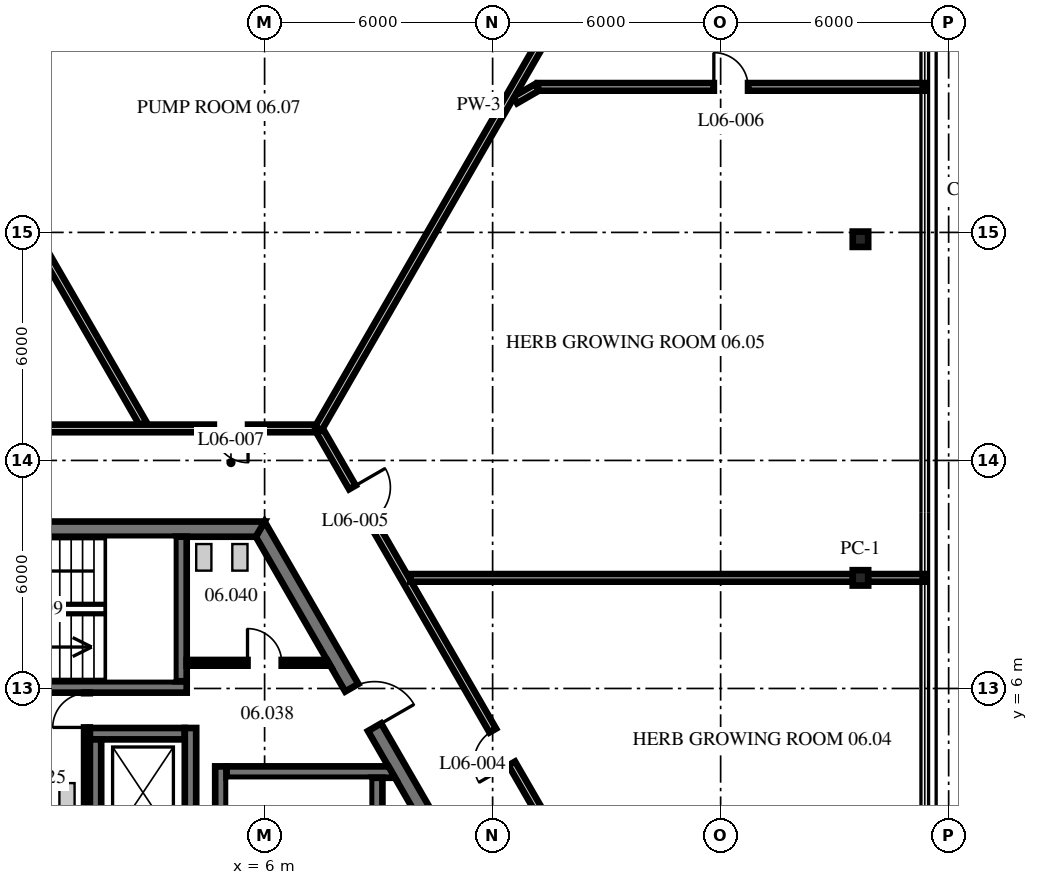
"""IFC4 building model, lengths in metres.
Left out: names, types, materials, properties, quantities, classifications, styles, units other than length and angle.
Written with IfcOpenShell. Run it as: python <this file> out.ifc"""

import sys

from ifc_helpers import new_model, si_unit, direction, frame, frame_2d, origin, origin_2d, place, context, subcontext, project, spatial, polyline, rectangle, i_section, outline, extrude, source, transform, mapped, element, fill, save


model = new_model("IFC4")
c1 = context("Model", 3, precision=1e-05, world=origin(), true_north=direction((0.0, 1.0)))
c2 = subcontext(c1, "Body", "Model", "MODEL_VIEW")
j1 = project(units=[si_unit("LENGTHUNIT", "METRE"), si_unit("PLANEANGLEUNIT", "RADIAN")], contexts=[c1])
p1 = place(None, origin())
s1 = spatial("IfcSite", under=j1, at=p1, CompositionType="ELEMENT")
p2 = place(p1, origin())
s2 = spatial("IfcBuilding", under=s1, at=p2, CompositionType="ELEMENT")
p3 = place(p2, frame((0.0, 0.0, 28.9)))
s3 = spatial("IfcBuildingStorey", under=s2, at=p3, CompositionType="ELEMENT", Elevation=28.9)
m1 = source(origin(), c2, "Body", "SweptSolid", [
    extrude(i_section(OverallWidth=0.404, OverallDepth=0.406, WebThickness=0.027, FlangeThickness=0.044, at=origin_2d()), origin(), (0.0, 0.0, 1.0), 4.3),
])
for number, where, z_axis, x_axis in (
    (1, (21.679, 8.91, 0.0), (0.0, 0.0, 1.0), (0.0, 1.0, 0.0)),
    (2, (21.679, 17.82, 0.0), (0.0, 0.0, 1.0), (0.0, 1.0, 0.0)),
):
    element("IfcColumn", number, at=place(p3, frame(where, z_axis=z_axis, x_axis=x_axis)), inside=s3, PredefinedType="COLUMN", context=c2, shape_type="MappedRepresentation", body=[
        mapped(m1, transform((0.0, 0.0, 0.0), scale=1.0)),
    ])
m2 = source(origin(), c2, "Body", "SweptSolid", [
    extrude(outline(polyline([(-0.115, -0.2), (11.885, -0.2), (11.654, 0.2), (0.115, 0.2), (-0.115, -0.2)])), origin(), (0.0, 0.0, 1.0), 4.1),
])
p4 = place(p3, frame((11.769, 0.0, 0.0), z_axis=(0.0, 0.0, 1.0), x_axis=(-0.499996592174, 0.866027371285, 0.0)))
e3 = element("IfcWall", 3, at=p4, inside=s3, PredefinedType="SHEAR", context=c2, shape_type="MappedRepresentation", body=[
    mapped(m2, transform((0.0, 0.0, 0.0), scale=1.0)),
])
p5 = place(p4, frame((5.75, 0.0, 0.0)))
e4 = element("IfcOpeningElement", 4, at=p5, cuts=e3, PredefinedType="OPENING", context=c2, shape_type="SweptSolid", body=[
    extrude(rectangle(XDim=1.2, YDim=2.1, at=frame_2d((0.6, 1.05))), frame((0.0, 0.21, 0.0), z_axis=(0.0, -1.0, 0.0), x_axis=(1.0, 0.0, 0.0)), (0.0, 0.0, 1.0), 0.42),
])
p6 = place(p3, frame((5.885, 10.192, 0.0), z_axis=(0.0, 0.0, 1.0), x_axis=(-1.0, 0.0, 0.0)))
e5 = element("IfcWall", 5, at=p6, inside=s3, PredefinedType="SHEAR", context=c2, shape_type="MappedRepresentation", body=[
    mapped(m2, transform((0.0, 0.0, 0.0), scale=1.0)),
])
p7 = place(p6, frame((7.985, 0.0, 0.0)))
e6 = element("IfcOpeningElement", 6, at=p7, cuts=e5, PredefinedType="OPENING", context=c2, shape_type="SweptSolid", body=[
    extrude(rectangle(XDim=1.2, YDim=2.1, at=frame_2d((0.6, 1.05))), frame((0.0, 0.21, 0.0), z_axis=(0.0, -1.0, 0.0), x_axis=(1.0, 0.0, 0.0)), (0.0, 0.0, 1.0), 0.42),
])
m3 = source(origin(), c2, "Body", "SweptSolid", [
    extrude(rectangle(XDim=2.5, YDim=0.3, at=frame_2d((1.25, 0.0))), origin(), (0.0, 0.0, 1.0), 4.1),
])
p8 = place(p3, frame((1.4, 4.81, 0.0), z_axis=(0.0, 0.0, 1.0), x_axis=(1.0, 0.0, 0.0)))
e7 = element("IfcWall", 7, at=p8, inside=s3, PredefinedType="SHEAR", context=c2, shape_type="MappedRepresentation", body=[
    mapped(m3, transform((0.0, 0.0, 0.0), scale=1.0)),
])
m4 = source(origin(), c2, "Body", "SweptSolid", [
    extrude(rectangle(XDim=4.45, YDim=0.3, at=frame_2d((2.225, 0.0))), origin(), (0.0, 0.0, 1.0), 4.1),
])
p9 = place(p3, frame((1.55, 0.21, 0.0), z_axis=(0.0, 0.0, 1.0), x_axis=(0.0, 1.0, 0.0)))
e8 = element("IfcWall", 8, at=p9, inside=s3, PredefinedType="SHEAR", context=c2, shape_type="MappedRepresentation", body=[
    mapped(m4, transform((0.0, 0.0, 0.0), scale=1.0)),
])
m5 = source(origin(), c2, "Body", "SweptSolid", [
    extrude(rectangle(XDim=2.9, YDim=0.3, at=frame_2d((1.45, 0.0))), origin(), (0.0, 0.0, 1.0), 4.1),
])
p10 = place(p3, frame((4.05, 2.06, 0.0), z_axis=(0.0, 0.0, 1.0), x_axis=(0.0, 1.0, 0.0)))
e9 = element("IfcWall", 9, at=p10, inside=s3, PredefinedType="SHEAR", context=c2, shape_type="MappedRepresentation", body=[
    mapped(m5, transform((0.0, 0.0, 0.0), scale=1.0)),
])
m6 = source(origin(), c2, "Body", "SweptSolid", [
    extrude(outline(polyline([(-0.15, -0.15), (9.99, -0.15), (9.99, 0.15), (0.15, 0.15), (-0.15, -0.15)])), origin(), (0.0, 0.0, 1.0), 4.1),
])
p11 = place(p3, frame((4.85, -6.04, 0.0), z_axis=(0.0, 0.0, 1.0), x_axis=(0.0, 1.0, 0.0)))
e10 = element("IfcWall", 10, at=p11, inside=s3, PredefinedType="SHEAR", context=c2, shape_type="MappedRepresentation", body=[
    mapped(m6, transform((0.0, 0.0, 0.0), scale=1.0)),
])
p12 = place(p11, frame((3.19, 0.0, 0.0)))
e11 = element("IfcOpeningElement", 11, at=p12, cuts=e10, PredefinedType="OPENING", context=c2, shape_type="SweptSolid", body=[
    extrude(rectangle(XDim=1.1, YDim=2.1, at=frame_2d((0.55, 1.05))), frame((0.0, 0.16, 0.0), z_axis=(0.0, -1.0, 0.0), x_axis=(1.0, 0.0, 0.0)), (0.0, 0.0, 1.0), 0.32),
])
m7 = source(origin(), c2, "Body", "SweptSolid", [
    extrude(outline(polyline([(0.0, -0.15), (0.0, 0.15), (4.26, 0.15), (4.433, -0.15), (0.0, -0.15)])), origin(), (0.0, 0.0, 1.0), 4.1),
])
p13 = place(p3, frame((5.0, 3.8, 0.0), z_axis=(0.0, 0.0, 1.0), x_axis=(1.0, 0.0, 0.0)))
e12 = element("IfcWall", 12, at=p13, inside=s3, PredefinedType="SHEAR", context=c2, shape_type="MappedRepresentation", body=[
    mapped(m7, transform((0.0, 0.0, 0.0), scale=1.0)),
])
m8 = source(origin(), c2, "Body", "SweptSolid", [
    extrude(rectangle(XDim=7.3, YDim=0.3, at=frame_2d((3.65, 0.0))), origin(), (0.0, 0.0, 1.0), 4.1),
])
p14 = place(p3, frame((8.95, -3.65, 0.0), z_axis=(0.0, 0.0, 1.0), x_axis=(0.0, 1.0, 0.0)))
e13 = element("IfcWall", 13, at=p14, inside=s3, PredefinedType="SHEAR", context=c2, shape_type="MappedRepresentation", body=[
    mapped(m8, transform((0.0, 0.0, 0.0), scale=1.0)),
])
m9 = source(origin(), c2, "Body", "SweptSolid", [
    extrude(rectangle(XDim=7.9, YDim=0.3, at=frame_2d((3.95, 0.0))), origin(), (0.0, 0.0, 1.0), 4.1),
])
p15 = place(p3, frame((-3.95, 6.04, 0.0), z_axis=(0.0, 0.0, 1.0), x_axis=(1.0, 0.0, 0.0)))
e14 = element("IfcWall", 14, at=p15, inside=s3, PredefinedType="SHEAR", context=c2, shape_type="MappedRepresentation", body=[
    mapped(m9, transform((0.0, 0.0, 0.0), scale=1.0)),
])
m10 = source(origin(), c2, "Body", "SweptSolid", [
    extrude(outline(polyline([(0.0, -0.15), (0.0, 0.15), (3.804, 0.15), (3.804, -0.15), (0.0, -0.15)])), origin(), (0.0, 0.0, 1.0), 4.1),
])
p16 = place(p3, frame((3.8, 6.19, 0.0), z_axis=(0.0, 0.0, 1.0), x_axis=(0.0, 1.0, 0.0)))
e15 = element("IfcWall", 15, at=p16, inside=s3, PredefinedType="SHEAR", context=c2, shape_type="MappedRepresentation", body=[
    mapped(m10, transform((0.0, 0.0, 0.0), scale=1.0)),
])
m11 = source(origin(), c2, "Body", "SweptSolid", [
    extrude(rectangle(XDim=3.18, YDim=0.15, at=frame_2d((1.59, 0.0))), origin(), (0.0, 0.0, 1.0), 4.1),
])
p17 = place(p3, frame((1.325, 2.71, 0.0), z_axis=(0.0, 0.0, 1.0), x_axis=(0.0, 1.0, 0.0)))
e16 = element("IfcWall", 16, at=p17, inside=s3, PredefinedType="PARTITIONING", context=c2, shape_type="MappedRepresentation", body=[
    mapped(m11, transform((0.0, 0.0, 0.0), scale=1.0)),
])
p18 = place(p17, frame((2.265, 0.0, 0.0)))
e17 = element("IfcOpeningElement", 17, at=p18, cuts=e16, PredefinedType="OPENING", context=c2, shape_type="SweptSolid", body=[
    extrude(rectangle(XDim=0.9, YDim=2.1, at=frame_2d((0.45, 1.05))), frame((0.0, 0.085, 0.0), z_axis=(0.0, -1.0, 0.0), x_axis=(1.0, 0.0, 0.0)), (0.0, 0.0, 1.0), 0.17),
])
m12 = source(origin(), c2, "Body", "SweptSolid", [
    extrude(outline(polyline([(0.0, -0.075), (0.0, 0.075), (3.693, 0.075), (3.78, -0.075), (0.0, -0.075)])), origin(), (0.0, 0.0, 1.0), 4.1),
])
p19 = place(p3, frame((3.95, 6.675, 0.0), z_axis=(0.0, 0.0, 1.0), x_axis=(1.0, 0.0, 0.0)))
e18 = element("IfcWall", 18, at=p19, inside=s3, PredefinedType="PARTITIONING", context=c2, shape_type="MappedRepresentation", body=[
    mapped(m12, transform((0.0, 0.0, 0.0), scale=1.0)),
])
p20 = place(p19, frame((1.6, 0.0, 0.0)))
e19 = element("IfcOpeningElement", 19, at=p20, cuts=e18, PredefinedType="OPENING", context=c2, shape_type="SweptSolid", body=[
    extrude(rectangle(XDim=0.9, YDim=2.1, at=frame_2d((0.45, 1.05))), frame((0.0, 0.085, 0.0), z_axis=(0.0, -1.0, 0.0), x_axis=(1.0, 0.0, 0.0)), (0.0, 0.0, 1.0), 0.17),
])
m13 = source(origin(), c2, "Body", "SweptSolid", [
    extrude(rectangle(XDim=11.652, YDim=0.2, at=frame_2d((5.826, 0.0))), origin(), (0.0, 0.0, 1.0), 3.343),
])
p21 = place(p3, frame((-3.027, 23.063, 0.0), z_axis=(0.0, 0.0, 1.0), x_axis=(0.499992708539, -0.86602961347, 0.0)))
e20 = element("IfcWall", 20, at=p21, inside=s3, PredefinedType="PARTITIONING", context=c2, shape_type="MappedRepresentation", body=[
    mapped(m13, transform((0.0, 0.0, 0.0), scale=1.0)),
])
m14 = source(origin(), c2, "Body", "SweptSolid", [
    extrude(rectangle(XDim=14.759, YDim=0.2, at=frame_2d((7.379, 0.0))), origin(), (0.0, 0.0, 1.0), 4.1),
])
p22 = place(p3, frame((7.449, 12.782, 0.0), z_axis=(0.0, 0.0, 1.0), x_axis=(0.500005012202, -0.866022509969, 0.0)))
e21 = element("IfcWall", 21, at=p22, inside=s3, PredefinedType="PARTITIONING", context=c2, shape_type="MappedRepresentation", body=[
    mapped(m14, transform((0.0, 0.0, 0.0), scale=1.0)),
])
p23 = place(p22, frame((9.109, 0.0, 0.0)))
e22 = element("IfcOpeningElement", 22, at=p23, cuts=e21, PredefinedType="OPENING", context=c2, shape_type="SweptSolid", body=[
    extrude(rectangle(XDim=1.0, YDim=2.1, at=frame_2d((0.5, 1.05))), frame((0.0, 0.11, 0.0), z_axis=(0.0, -1.0, 0.0), x_axis=(1.0, 0.0, 0.0)), (0.0, 0.0, 1.0), 0.22),
])
p24 = place(p22, frame((1.721, 0.0, 0.0)))
e23 = element("IfcOpeningElement", 23, at=p24, cuts=e21, PredefinedType="OPENING", context=c2, shape_type="SweptSolid", body=[
    extrude(rectangle(XDim=1.0, YDim=2.1, at=frame_2d((0.5, 1.05))), frame((0.0, 0.11, 0.0), z_axis=(0.0, -1.0, 0.0), x_axis=(1.0, 0.0, 0.0)), (0.0, 0.0, 1.0), 0.22),
])
p25 = place(p3, frame((9.835, 8.91, 0.0), z_axis=(0.0, 0.0, 1.0), x_axis=(1.0, 0.0, 0.0)))
e24 = element("IfcWall", 24, at=p25, inside=s3, PredefinedType="PARTITIONING", context=c2, shape_type="MappedRepresentation", body=[
    mapped(m13, transform((0.0, 0.0, 0.0), scale=1.0)),
])
m15 = source(origin(), c2, "Body", "SweptSolid", [
    extrude(rectangle(XDim=1.499, YDim=0.2, at=frame_2d((0.749, 0.0))), origin(), (0.0, 0.0, 1.0), 4.1),
])
p26 = place(p3, frame((21.873, 8.91, 0.0), z_axis=(0.0, 0.0, 1.0), x_axis=(1.0, 0.0, 0.0)))
e25 = element("IfcWall", 25, at=p26, inside=s3, PredefinedType="PARTITIONING", context=c2, shape_type="MappedRepresentation", body=[
    mapped(m15, transform((0.0, 0.0, 0.0), scale=1.0)),
])
m16 = source(origin(), c2, "Body", "SweptSolid", [
    extrude(rectangle(XDim=14.689, YDim=0.2, at=frame_2d((7.344, 0.0))), origin(), (0.0, 0.0, 1.0), 4.1),
])
p27 = place(p3, frame((-7.344, 12.842, 0.0), z_axis=(0.0, 0.0, 1.0), x_axis=(1.0, 0.0, 0.0)))
e26 = element("IfcWall", 26, at=p27, inside=s3, PredefinedType="PARTITIONING", context=c2, shape_type="MappedRepresentation", body=[
    mapped(m16, transform((0.0, 0.0, 0.0), scale=1.0)),
])
p28 = place(p27, frame((12.009, 0.0, 0.0)))
e27 = element("IfcOpeningElement", 27, at=p28, cuts=e26, PredefinedType="OPENING", context=c2, shape_type="SweptSolid", body=[
    extrude(rectangle(XDim=0.9, YDim=2.1, at=frame_2d((0.45, 1.05))), frame((0.0, 0.11, 0.0), z_axis=(0.0, -1.0, 0.0), x_axis=(1.0, 0.0, 0.0)), (0.0, 0.0, 1.0), 0.22),
])
p29 = place(p3, frame((13.192, 21.83, 0.0), z_axis=(0.0, 0.0, 1.0), x_axis=(1.0, 0.0, 0.0)))
e28 = element("IfcWall", 28, at=p29, inside=s3, PredefinedType="PARTITIONING", context=c2, shape_type="SweptSolid", body=[
    extrude(rectangle(XDim=10.18, YDim=0.2, at=frame_2d((5.09, 0.0))), origin(), (0.0, 0.0, 1.0), 4.1),
])
p30 = place(p29, frame((4.63, 0.0, 0.0)))
e29 = element("IfcOpeningElement", 29, at=p30, cuts=e28, PredefinedType="OPENING", context=c2, shape_type="SweptSolid", body=[
    extrude(rectangle(XDim=0.9, YDim=2.1, at=frame_2d((0.45, 1.05))), frame((0.0, 0.11, 0.0), z_axis=(0.0, -1.0, 0.0), x_axis=(1.0, 0.0, 0.0)), (0.0, 0.0, 1.0), 0.22),
])
p31 = place(p3, frame((12.594, 21.485, 0.0), z_axis=(0.0, 0.0, 1.0), x_axis=(0.865932775861, 0.500160401961, 0.0)))
e30 = element("IfcWall", 30, at=p31, inside=s3, PredefinedType="PARTITIONING", context=c2, shape_type="SweptSolid", body=[
    extrude(rectangle(XDim=0.659, YDim=0.2, at=frame_2d((0.33, 0.0))), origin(), (0.0, 0.0, 1.0), 4.1),
])
m17 = source(origin(), c2, "Body", "SweptSolid", [
    extrude(rectangle(XDim=18.967, YDim=0.2, at=frame_2d((9.483, 0.0))), origin(), (0.0, 0.0, 1.0), 4.1),
])
p32 = place(p3, frame((7.414, 12.842, 0.0), z_axis=(0.0, 0.0, 1.0), x_axis=(0.500004356295, 0.866022888662, 0.0)))
e31 = element("IfcWall", 31, at=p32, inside=s3, PredefinedType="PARTITIONING", context=c2, shape_type="MappedRepresentation", body=[
    mapped(m17, transform((0.0, 0.0, 0.0), scale=1.0)),
])
p33 = place(p5, frame((1.2, 0.0, 0.0), z_axis=(0.0, 0.0, 1.0), x_axis=(-1.0, 0.0, 0.0)))
e32 = element("IfcDoor", 32, at=p33, inside=s3, OperationType="SINGLE_SWING_RIGHT", PredefinedType="DOOR", context=c2, shape_type="SweptSolid", body=[
    extrude(rectangle(XDim=1.2, YDim=2.1, at=frame_2d((0.6, 1.05))), frame((0.0, 0.025, 0.0), z_axis=(0.0, -1.0, 0.0), x_axis=(1.0, 0.0, 0.0)), (0.0, 0.0, 1.0), 0.05),
])
fill(e4, e32)
p34 = place(p18, origin())
e33 = element("IfcDoor", 33, at=p34, inside=s3, OperationType="SINGLE_SWING_LEFT", PredefinedType="DOOR", context=c2, shape_type="SweptSolid", body=[
    extrude(rectangle(XDim=0.9, YDim=2.1, at=frame_2d((0.45, 1.05))), frame((0.0, 0.025, 0.0), z_axis=(0.0, -1.0, 0.0), x_axis=(1.0, 0.0, 0.0)), (0.0, 0.0, 1.0), 0.05),
])
fill(e17, e33)
p35 = place(p20, origin())
e34 = element("IfcDoor", 34, at=p35, inside=s3, OperationType="SINGLE_SWING_LEFT", PredefinedType="DOOR", context=c2, shape_type="SweptSolid", body=[
    extrude(rectangle(XDim=0.9, YDim=2.1, at=frame_2d((0.45, 1.05))), frame((0.0, 0.025, 0.0), z_axis=(0.0, -1.0, 0.0), x_axis=(1.0, 0.0, 0.0)), (0.0, 0.0, 1.0), 0.05),
])
fill(e19, e34)
p36 = place(p23, origin())
e35 = element("IfcDoor", 35, at=p36, inside=s3, OperationType="SINGLE_SWING_RIGHT", PredefinedType="DOOR", context=c2, shape_type="SweptSolid", body=[
    extrude(rectangle(XDim=1.0, YDim=2.1, at=frame_2d((0.5, 1.05))), frame((0.0, 0.025, 0.0), z_axis=(0.0, -1.0, 0.0), x_axis=(1.0, 0.0, 0.0)), (0.0, 0.0, 1.0), 0.05),
])
fill(e22, e35)
p37 = place(p24, origin())
e36 = element("IfcDoor", 36, at=p37, inside=s3, OperationType="SINGLE_SWING_LEFT", PredefinedType="DOOR", context=c2, shape_type="SweptSolid", body=[
    extrude(rectangle(XDim=1.0, YDim=2.1, at=frame_2d((0.5, 1.05))), frame((0.0, 0.025, 0.0), z_axis=(0.0, -1.0, 0.0), x_axis=(1.0, 0.0, 0.0)), (0.0, 0.0, 1.0), 0.05),
])
fill(e23, e36)
p38 = place(p30, origin())
e37 = element("IfcDoor", 37, at=p38, inside=s3, OperationType="SINGLE_SWING_LEFT", PredefinedType="DOOR", context=c2, shape_type="SweptSolid", body=[
    extrude(rectangle(XDim=0.9, YDim=2.1, at=frame_2d((0.45, 1.05))), frame((0.0, 0.025, 0.0), z_axis=(0.0, -1.0, 0.0), x_axis=(1.0, 0.0, 0.0)), (0.0, 0.0, 1.0), 0.05),
])
fill(e29, e37)
p39 = place(p28, origin())
e38 = element("IfcDoor", 38, at=p39, inside=s3, OperationType="SINGLE_SWING_RIGHT", PredefinedType="DOOR", context=c2, shape_type="SweptSolid", body=[
    extrude(rectangle(XDim=0.9, YDim=2.1, at=frame_2d((0.45, 1.05))), frame((0.0, 0.025, 0.0), z_axis=(0.0, -1.0, 0.0), x_axis=(1.0, 0.0, 0.0)), (0.0, 0.0, 1.0), 0.05),
])
fill(e27, e38)
save(model, sys.argv[1])
